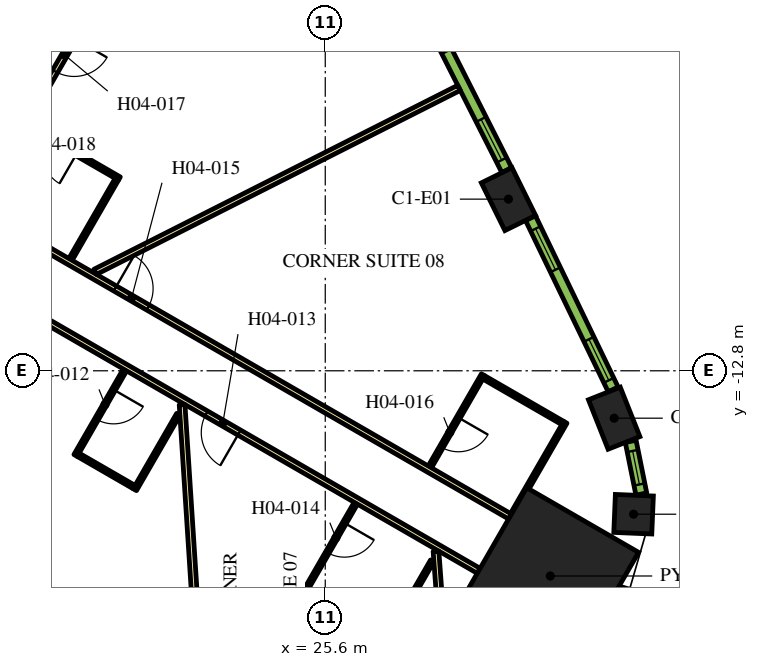
"""IFC4 building model, lengths in metres.
Left out: names, types, materials, properties, quantities, classifications, styles, units other than length and angle.
Written with IfcOpenShell. Run it as: python <this file> out.ifc"""

import sys

from ifc_helpers import new_model, si_unit, direction, frame, frame_2d, origin, origin_2d, place, context, subcontext, project, spatial, rectangle, extrude, element, fill, save


model = new_model("IFC4")
c1 = context("Model", 3, precision=1e-05, world=origin(), true_north=direction((0.0, 1.0)))
c2 = subcontext(c1, "Body", "Model", "MODEL_VIEW")
j1 = project(units=[si_unit("LENGTHUNIT", "METRE"), si_unit("PLANEANGLEUNIT", "RADIAN")], contexts=[c1])
p1 = place(None, origin())
s1 = spatial("IfcSite", under=j1, at=p1, CompositionType="ELEMENT")
p2 = place(p1, origin())
s2 = spatial("IfcBuilding", under=s1, at=p2, CompositionType="ELEMENT")
p3 = place(p2, frame((0.0, 0.0, 62.7)))
s3 = spatial("IfcBuildingStorey", under=s2, at=p3, CompositionType="ELEMENT", Elevation=62.7)
p4 = place(p3, frame((31.522, -18.199, 0.0), z_axis=(0.0, 0.0, 1.0), x_axis=(0.866025403784, -0.5, 0.0)))
e1 = element("IfcColumn", 1, at=p4, inside=s3, PredefinedType="COLUMN", context=c2, shape_type="SweptSolid", body=[
    extrude(rectangle(XDim=3.4, YDim=3.4, at=origin_2d()), origin(), (0.0, 0.0, 1.0), 3.9),
])
p5 = place(p3, frame((33.713, -16.574, 0.0), z_axis=(0.0, 0.0, 1.0), x_axis=(0.041582693819, 0.999135065732, 0.0)))
e2 = element("IfcColumn", 2, at=p5, inside=s3, PredefinedType="COLUMN", context=c2, shape_type="SweptSolid", body=[
    extrude(rectangle(XDim=1.0, YDim=1.0, at=origin_2d()), origin(), (0.0, 0.0, 1.0), 3.9),
])
for number, where, z_axis, x_axis in (
    (3, (33.203, -14.047, 0.0), (0.0, 0.0, 1.0), (-0.369, 0.929, 0.0)),
    (4, (30.421, -8.284, 0.0), (0.0, 0.0, 1.0), (-0.443, 0.897, 0.0)),
):
    element("IfcColumn", number, at=place(p3, frame(where, z_axis=z_axis, x_axis=x_axis)), inside=s3, PredefinedType="COLUMN", context=c2, shape_type="SweptSolid", body=[
        extrude(rectangle(XDim=1.4, YDim=0.9, at=origin_2d()), origin(), (0.0, 0.0, 1.0), 3.9),
    ])
p6 = place(p3, frame((16.412, -8.523, 0.0), z_axis=(0.0, 0.0, 1.0), x_axis=(0.866022197818, -0.500005552856, 0.0)))
e5 = element("IfcWall", 5, at=p6, inside=s3, PredefinedType="PARTITIONING", context=c2, shape_type="SweptSolid", body=[
    extrude(rectangle(XDim=16.224, YDim=0.15, at=frame_2d((8.112, 0.0))), origin(), (0.0, 0.0, 1.0), 2.75),
])
p7 = place(p6, frame((4.223, 0.0, 0.0)))
e6 = element("IfcOpeningElement", 6, at=p7, cuts=e5, PredefinedType="OPENING", context=c2, shape_type="SweptSolid", body=[
    extrude(rectangle(XDim=1.0, YDim=2.1, at=frame_2d((0.5, 1.05))), frame((0.0, 0.085, 0.0), z_axis=(0.0, -1.0, 0.0), x_axis=(1.0, 0.0, 0.0)), (0.0, 0.0, 1.0), 0.17),
])
p8 = place(p3, frame((19.081, -3.9, 0.0), z_axis=(0.0, 0.0, 1.0), x_axis=(-0.499974327079, -0.866040225545, 0.0)))
e7 = element("IfcWall", 7, at=p8, inside=s3, PredefinedType="PARTITIONING", context=c2, shape_type="SweptSolid", body=[
    extrude(rectangle(XDim=5.258, YDim=0.15, at=frame_2d((2.629, 0.0))), origin(), (0.0, 0.0, 1.0), 2.75),
])
p9 = place(p8, frame((0.18, 0.0, 0.0)))
e8 = element("IfcOpeningElement", 8, at=p9, cuts=e7, PredefinedType="OPENING", context=c2, shape_type="SweptSolid", body=[
    extrude(rectangle(XDim=1.0, YDim=2.1, at=frame_2d((0.5, 1.05))), frame((0.0, 0.085, 0.0), z_axis=(0.0, -1.0, 0.0), x_axis=(1.0, 0.0, 0.0)), (0.0, 0.0, 1.0), 0.17),
])
p10 = place(p3, frame((29.638, -18.064, 0.0), z_axis=(0.0, 0.0, 1.0), x_axis=(-0.866026175601, 0.499998663172, 0.0)))
e9 = element("IfcWall", 9, at=p10, inside=s3, PredefinedType="PARTITIONING", context=c2, shape_type="SweptSolid", body=[
    extrude(rectangle(XDim=16.144, YDim=0.15, at=frame_2d((8.072, 0.0))), origin(), (0.0, 0.0, 1.0), 2.75),
])
p11 = place(p10, frame((14.714, 0.0, 0.0)))
e10 = element("IfcOpeningElement", 10, at=p11, cuts=e9, PredefinedType="OPENING", context=c2, shape_type="SweptSolid", body=[
    extrude(rectangle(XDim=1.0, YDim=2.1, at=frame_2d((0.5, 1.05))), frame((0.0, 0.085, 0.0), z_axis=(0.0, -1.0, 0.0), x_axis=(1.0, 0.0, 0.0)), (0.0, 0.0, 1.0), 0.17),
])
p12 = place(p10, frame((7.275, 0.0, 0.0)))
e11 = element("IfcOpeningElement", 11, at=p12, cuts=e9, PredefinedType="OPENING", context=c2, shape_type="SweptSolid", body=[
    extrude(rectangle(XDim=1.0, YDim=2.1, at=frame_2d((0.5, 1.05))), frame((0.0, 0.085, 0.0), z_axis=(0.0, -1.0, 0.0), x_axis=(1.0, 0.0, 0.0)), (0.0, 0.0, 1.0), 0.17),
])
p13 = place(p3, frame((29.12, -5.356, 0.0), z_axis=(0.0, 0.0, 1.0), x_axis=(-0.892401965553, -0.451241323327, 0.0)))
e12 = element("IfcWall", 12, at=p13, inside=s3, PredefinedType="PARTITIONING", context=c2, shape_type="SweptSolid", body=[
    extrude(rectangle(XDim=10.729, YDim=0.15, at=frame_2d((5.364, 0.0))), origin(), (0.0, 0.0, 1.0), 2.75),
])
p14 = place(p3, frame((22.355, -21.754, 0.0), z_axis=(0.0, 0.0, 1.0), x_axis=(-0.064639533143, 0.997908678565, 0.0)))
e13 = element("IfcWall", 13, at=p14, inside=s3, PredefinedType="PARTITIONING", context=c2, shape_type="SweptSolid", body=[
    extrude(rectangle(XDim=8.079, YDim=0.15, at=frame_2d((4.04, 0.0))), origin(), (0.0, 0.0, 1.0), 2.75),
])
p15 = place(p3, frame((28.79, -21.273, 0.0), z_axis=(0.0, 0.0, 1.0), x_axis=(-0.07382592098, 0.997271143366, 0.0)))
e14 = element("IfcWall", 14, at=p15, inside=s3, PredefinedType="PARTITIONING", context=c2, shape_type="SweptSolid", body=[
    extrude(rectangle(XDim=3.734, YDim=0.15, at=frame_2d((1.867, 0.0))), origin(), (0.0, 0.0, 1.0), 2.75),
])
p16 = place(p3, frame((20.33, -12.777, 0.0), z_axis=(0.0, 0.0, 1.0), x_axis=(-0.500006934395, -0.866021400173, 0.0)))
e15 = element("IfcWall", 15, at=p16, inside=s3, PredefinedType="PARTITIONING", context=c2, shape_type="SweptSolid", body=[
    extrude(rectangle(XDim=2.6, YDim=0.1, at=frame_2d((1.3, 0.0))), origin(), (0.0, 0.0, 1.0), 2.75),
])
p17 = place(p16, frame((0.6, 0.0, 0.0)))
e16 = element("IfcOpeningElement", 16, at=p17, cuts=e15, PredefinedType="OPENING", context=c2, shape_type="SweptSolid", body=[
    extrude(rectangle(XDim=0.9, YDim=2.1, at=frame_2d((0.45, 1.05))), frame((0.0, 0.06, 0.0), z_axis=(0.0, -1.0, 0.0), x_axis=(1.0, 0.0, 0.0)), (0.0, 0.0, 1.0), 0.12),
])
p18 = place(p3, frame((19.098, -15.01, 0.0), z_axis=(0.0, 0.0, 1.0), x_axis=(0.86605165483, -0.499954529098, 0.0)))
e17 = element("IfcWall", 17, at=p18, inside=s3, PredefinedType="PARTITIONING", context=c2, shape_type="SweptSolid", body=[
    extrude(rectangle(XDim=1.7, YDim=0.1, at=frame_2d((0.85, 0.0))), origin(), (0.0, 0.0, 1.0), 2.75),
])
p19 = place(p3, frame((21.734, -13.945, 0.0), z_axis=(0.0, 0.0, 1.0), x_axis=(-0.500014693593, -0.866016920268, 0.0)))
e18 = element("IfcWall", 18, at=p19, inside=s3, PredefinedType="PARTITIONING", context=c2, shape_type="SweptSolid", body=[
    extrude(rectangle(XDim=2.29, YDim=0.1, at=frame_2d((1.145, 0.0))), origin(), (0.0, 0.0, 1.0), 2.75),
])
p20 = place(p3, frame((26.405, -16.284, 0.0), z_axis=(0.0, 0.0, 1.0), x_axis=(-0.49998411664, -0.866034573852, 0.0)))
e19 = element("IfcWall", 19, at=p20, inside=s3, PredefinedType="PARTITIONING", context=c2, shape_type="SweptSolid", body=[
    extrude(rectangle(XDim=2.8, YDim=0.1, at=frame_2d((1.4, 0.0))), origin(), (0.0, 0.0, 1.0), 2.75),
])
p21 = place(p20, frame((0.6, 0.0, 0.0)))
e20 = element("IfcOpeningElement", 20, at=p21, cuts=e19, PredefinedType="OPENING", context=c2, shape_type="SweptSolid", body=[
    extrude(rectangle(XDim=0.9, YDim=2.1, at=frame_2d((0.45, 1.05))), frame((0.0, 0.06, 0.0), z_axis=(0.0, -1.0, 0.0), x_axis=(1.0, 0.0, 0.0)), (0.0, 0.0, 1.0), 0.12),
])
p22 = place(p3, frame((28.415, -17.802, 0.0), z_axis=(0.0, 0.0, 1.0), x_axis=(-0.499945955465, -0.866056604163, 0.0)))
e21 = element("IfcWall", 21, at=p22, inside=s3, PredefinedType="PARTITIONING", context=c2, shape_type="SweptSolid", body=[
    extrude(rectangle(XDim=2.49, YDim=0.1, at=frame_2d((1.245, 0.0))), origin(), (0.0, 0.0, 1.0), 2.75),
])
p23 = place(p3, frame((29.752, -12.905, 0.0), z_axis=(0.0, 0.0, 1.0), x_axis=(-0.500049511043, -0.865996816683, 0.0)))
e22 = element("IfcWall", 22, at=p23, inside=s3, PredefinedType="PARTITIONING", context=c2, shape_type="SweptSolid", body=[
    extrude(rectangle(XDim=2.8, YDim=0.1, at=frame_2d((1.4, 0.0))), origin(), (0.0, 0.0, 1.0), 2.75),
])
p24 = place(p23, frame((1.3, 0.0, 0.0)))
e23 = element("IfcOpeningElement", 23, at=p24, cuts=e22, PredefinedType="OPENING", context=c2, shape_type="SweptSolid", body=[
    extrude(rectangle(XDim=0.9, YDim=2.1, at=frame_2d((0.45, 1.05))), frame((0.0, 0.06, 0.0), z_axis=(0.0, -1.0, 0.0), x_axis=(1.0, 0.0, 0.0)), (0.0, 0.0, 1.0), 0.12),
])
p25 = place(p3, frame((29.771, -12.973, 0.0), z_axis=(0.0, 0.0, 1.0), x_axis=(0.865980596518, -0.500077600433, 0.0)))
e24 = element("IfcWall", 24, at=p25, inside=s3, PredefinedType="PARTITIONING", context=c2, shape_type="SweptSolid", body=[
    extrude(rectangle(XDim=2.4, YDim=0.1, at=frame_2d((1.2, 0.0))), origin(), (0.0, 0.0, 1.0), 2.75),
])
p26 = place(p3, frame((30.518, -16.58, 0.0), z_axis=(0.0, 0.0, 1.0), x_axis=(0.49998411664, 0.866034573852, 0.0)))
e25 = element("IfcWall", 25, at=p26, inside=s3, PredefinedType="PARTITIONING", context=c2, shape_type="SweptSolid", body=[
    extrude(rectangle(XDim=2.8, YDim=0.1, at=frame_2d((1.4, 0.0))), origin(), (0.0, 0.0, 1.0), 2.75),
])
p27 = place(p3, frame((20.182, -7.743, 0.0), z_axis=(0.0, 0.0, 1.0), x_axis=(-0.866034573852, 0.49998411664, 0.0)))
e26 = element("IfcWall", 26, at=p27, inside=s3, PredefinedType="PARTITIONING", context=c2, shape_type="SweptSolid", body=[
    extrude(rectangle(XDim=2.8, YDim=0.1, at=frame_2d((1.4, 0.0))), origin(), (0.0, 0.0, 1.0), 2.75),
])
p28 = place(p27, frame((1.3, 0.0, 0.0)))
e27 = element("IfcOpeningElement", 27, at=p28, cuts=e26, PredefinedType="OPENING", context=c2, shape_type="SweptSolid", body=[
    extrude(rectangle(XDim=0.9, YDim=2.1, at=frame_2d((0.45, 1.05))), frame((0.0, 0.06, 0.0), z_axis=(0.0, -1.0, 0.0), x_axis=(1.0, 0.0, 0.0)), (0.0, 0.0, 1.0), 0.12),
])
p29 = place(p3, frame((20.109, -7.771, 0.0), z_axis=(0.0, 0.0, 1.0), x_axis=(-0.500077573772, -0.865980611914, 0.0)))
e28 = element("IfcWall", 28, at=p29, inside=s3, PredefinedType="PARTITIONING", context=c2, shape_type="SweptSolid", body=[
    extrude(rectangle(XDim=2.42, YDim=0.1, at=frame_2d((1.21, 0.0))), origin(), (0.0, 0.0, 1.0), 2.75),
])
p30 = place(p3, frame((33.257, -19.241, 0.0), z_axis=(0.0, 0.0, 1.0), x_axis=(0.278981320915, 0.960296528464, 0.0)))
e29 = element("IfcWall", 29, at=p30, inside=s3, PredefinedType="SOLIDWALL", context=c2, shape_type="SweptSolid", body=[
    extrude(rectangle(XDim=0.764, YDim=0.29, at=frame_2d((0.382, 0.0))), origin(), (0.0, 0.0, 1.0), 3.65),
])
p31 = place(p3, frame((33.917, -16.044, 0.0), z_axis=(0.0, 0.0, 1.0), x_axis=(-0.198106888228, 0.980180422594, 0.0)))
e30 = element("IfcWall", 30, at=p31, inside=s3, PredefinedType="SOLIDWALL", context=c2, shape_type="SweptSolid", body=[
    extrude(rectangle(XDim=1.415, YDim=0.29, at=frame_2d((0.708, 0.0))), origin(), (0.0, 0.0, 1.0), 3.65),
])
p32 = place(p31, frame((0.257, 0.0, 0.9)))
e31 = element("IfcOpeningElement", 31, at=p32, cuts=e30, PredefinedType="OPENING", context=c2, shape_type="SweptSolid", body=[
    extrude(rectangle(XDim=0.9, YDim=2.15, at=frame_2d((0.45, 1.075))), frame((0.0, 0.155, 0.0), z_axis=(0.0, -1.0, 0.0), x_axis=(1.0, 0.0, 0.0)), (0.0, 0.0, 1.0), 0.31),
])
p33 = place(p3, frame((33.176, -13.29, 0.0), z_axis=(0.0, 0.0, 1.0), x_axis=(-0.434664499056, 0.900592456808, 0.0)))
e32 = element("IfcWall", 32, at=p33, inside=s3, PredefinedType="SOLIDWALL", context=c2, shape_type="SweptSolid", body=[
    extrude(rectangle(XDim=5.006, YDim=0.29, at=frame_2d((2.503, 0.0))), origin(), (0.0, 0.0, 1.0), 3.65),
])
p34 = place(p33, frame((0.265, 0.0, 0.9)))
e33 = element("IfcOpeningElement", 33, at=p34, cuts=e32, PredefinedType="OPENING", context=c2, shape_type="SweptSolid", body=[
    extrude(rectangle(XDim=1.2, YDim=2.15, at=frame_2d((0.6, 1.075))), frame((0.0, 0.155, 0.0), z_axis=(0.0, -1.0, 0.0), x_axis=(1.0, 0.0, 0.0)), (0.0, 0.0, 1.0), 0.31),
])
p35 = place(p33, frame((3.496, 0.0, 0.9)))
e34 = element("IfcOpeningElement", 34, at=p35, cuts=e32, PredefinedType="OPENING", context=c2, shape_type="SweptSolid", body=[
    extrude(rectangle(XDim=1.2, YDim=2.15, at=frame_2d((0.6, 1.075))), frame((0.0, 0.155, 0.0), z_axis=(0.0, -1.0, 0.0), x_axis=(1.0, 0.0, 0.0)), (0.0, 0.0, 1.0), 0.31),
])
p36 = place(p3, frame((30.377, -7.521, 0.0), z_axis=(0.0, 0.0, 1.0), x_axis=(-0.451233929645, 0.892405704115, 0.0)))
e35 = element("IfcWall", 35, at=p36, inside=s3, PredefinedType="SOLIDWALL", context=c2, shape_type="SweptSolid", body=[
    extrude(rectangle(XDim=4.998, YDim=0.29, at=frame_2d((2.499, 0.0))), origin(), (0.0, 0.0, 1.0), 3.65),
])
p37 = place(p36, frame((0.297, 0.0, 0.9)))
e36 = element("IfcOpeningElement", 36, at=p37, cuts=e35, PredefinedType="OPENING", context=c2, shape_type="SweptSolid", body=[
    extrude(rectangle(XDim=1.2, YDim=2.15, at=frame_2d((0.6, 1.075))), frame((0.0, 0.155, 0.0), z_axis=(0.0, -1.0, 0.0), x_axis=(1.0, 0.0, 0.0)), (0.0, 0.0, 1.0), 0.31),
])
p38 = place(p36, frame((3.501, 0.0, 0.9)))
e37 = element("IfcOpeningElement", 37, at=p38, cuts=e35, PredefinedType="OPENING", context=c2, shape_type="SweptSolid", body=[
    extrude(rectangle(XDim=1.2, YDim=2.15, at=frame_2d((0.6, 1.075))), frame((0.0, 0.155, 0.0), z_axis=(0.0, -1.0, 0.0), x_axis=(1.0, 0.0, 0.0)), (0.0, 0.0, 1.0), 0.31),
])
p39 = place(p17, origin())
e38 = element("IfcDoor", 38, at=p39, inside=s3, OperationType="SINGLE_SWING_RIGHT", PredefinedType="DOOR", context=c2, shape_type="SweptSolid", body=[
    extrude(rectangle(XDim=0.9, YDim=2.1, at=frame_2d((0.45, 1.05))), frame((0.0, 0.025, 0.0), z_axis=(0.0, -1.0, 0.0), x_axis=(1.0, 0.0, 0.0)), (0.0, 0.0, 1.0), 0.05),
])
fill(e16, e38)
p40 = place(p12, origin())
e39 = element("IfcDoor", 39, at=p40, inside=s3, OperationType="SINGLE_SWING_RIGHT", PredefinedType="DOOR", context=c2, shape_type="SweptSolid", body=[
    extrude(rectangle(XDim=1.0, YDim=2.1, at=frame_2d((0.5, 1.05))), frame((0.0, 0.025, 0.0), z_axis=(0.0, -1.0, 0.0), x_axis=(1.0, 0.0, 0.0)), (0.0, 0.0, 1.0), 0.05),
])
fill(e11, e39)
p41 = place(p21, origin())
e40 = element("IfcDoor", 40, at=p41, inside=s3, OperationType="SINGLE_SWING_LEFT", PredefinedType="DOOR", context=c2, shape_type="SweptSolid", body=[
    extrude(rectangle(XDim=0.9, YDim=2.1, at=frame_2d((0.45, 1.05))), frame((0.0, 0.025, 0.0), z_axis=(0.0, -1.0, 0.0), x_axis=(1.0, 0.0, 0.0)), (0.0, 0.0, 1.0), 0.05),
])
fill(e20, e40)
p42 = place(p7, origin())
e41 = element("IfcDoor", 41, at=p42, inside=s3, OperationType="SINGLE_SWING_LEFT", PredefinedType="DOOR", context=c2, shape_type="SweptSolid", body=[
    extrude(rectangle(XDim=1.0, YDim=2.1, at=frame_2d((0.5, 1.05))), frame((0.0, 0.025, 0.0), z_axis=(0.0, -1.0, 0.0), x_axis=(1.0, 0.0, 0.0)), (0.0, 0.0, 1.0), 0.05),
])
fill(e6, e41)
p43 = place(p24, origin())
e42 = element("IfcDoor", 42, at=p43, inside=s3, OperationType="SINGLE_SWING_LEFT", PredefinedType="DOOR", context=c2, shape_type="SweptSolid", body=[
    extrude(rectangle(XDim=0.9, YDim=2.1, at=frame_2d((0.45, 1.05))), frame((0.0, 0.025, 0.0), z_axis=(0.0, -1.0, 0.0), x_axis=(1.0, 0.0, 0.0)), (0.0, 0.0, 1.0), 0.05),
])
fill(e23, e42)
p44 = place(p9, origin())
e43 = element("IfcDoor", 43, at=p44, inside=s3, OperationType="SINGLE_SWING_LEFT", PredefinedType="DOOR", context=c2, shape_type="SweptSolid", body=[
    extrude(rectangle(XDim=1.0, YDim=2.1, at=frame_2d((0.5, 1.05))), frame((0.0, 0.025, 0.0), z_axis=(0.0, -1.0, 0.0), x_axis=(1.0, 0.0, 0.0)), (0.0, 0.0, 1.0), 0.05),
])
fill(e8, e43)
p45 = place(p28, origin())
e44 = element("IfcDoor", 44, at=p45, inside=s3, OperationType="SINGLE_SWING_RIGHT", PredefinedType="DOOR", context=c2, shape_type="SweptSolid", body=[
    extrude(rectangle(XDim=0.9, YDim=2.1, at=frame_2d((0.45, 1.05))), frame((0.0, 0.025, 0.0), z_axis=(0.0, -1.0, 0.0), x_axis=(1.0, 0.0, 0.0)), (0.0, 0.0, 1.0), 0.05),
])
fill(e27, e44)
p46 = place(p32, origin())
e45 = element("IfcWindow", 45, at=p46, inside=s3, PartitioningType="SINGLE_PANEL", PredefinedType="WINDOW", context=c2, shape_type="SweptSolid", body=[
    extrude(rectangle(XDim=0.9, YDim=2.15, at=frame_2d((0.45, 1.075))), frame((0.0, 0.015, 0.0), z_axis=(0.0, -1.0, 0.0), x_axis=(1.0, 0.0, 0.0)), (0.0, 0.0, 1.0), 0.06),
])
fill(e31, e45)
p47 = place(p34, origin())
e46 = element("IfcWindow", 46, at=p47, inside=s3, PartitioningType="DOUBLE_PANEL_VERTICAL", PredefinedType="WINDOW", context=c2, shape_type="SweptSolid", body=[
    extrude(rectangle(XDim=1.2, YDim=2.15, at=frame_2d((0.6, 1.075))), frame((0.0, 0.015, 0.0), z_axis=(0.0, -1.0, 0.0), x_axis=(1.0, 0.0, 0.0)), (0.0, 0.0, 1.0), 0.06),
])
fill(e33, e46)
p48 = place(p35, origin())
e47 = element("IfcWindow", 47, at=p48, inside=s3, PartitioningType="DOUBLE_PANEL_VERTICAL", PredefinedType="WINDOW", context=c2, shape_type="SweptSolid", body=[
    extrude(rectangle(XDim=1.2, YDim=2.15, at=frame_2d((0.6, 1.075))), frame((0.0, 0.015, 0.0), z_axis=(0.0, -1.0, 0.0), x_axis=(1.0, 0.0, 0.0)), (0.0, 0.0, 1.0), 0.06),
])
fill(e34, e47)
p49 = place(p37, origin())
e48 = element("IfcWindow", 48, at=p49, inside=s3, PartitioningType="DOUBLE_PANEL_VERTICAL", PredefinedType="WINDOW", context=c2, shape_type="SweptSolid", body=[
    extrude(rectangle(XDim=1.2, YDim=2.15, at=frame_2d((0.6, 1.075))), frame((0.0, 0.015, 0.0), z_axis=(0.0, -1.0, 0.0), x_axis=(1.0, 0.0, 0.0)), (0.0, 0.0, 1.0), 0.06),
])
fill(e36, e48)
save(model, sys.argv[1])
